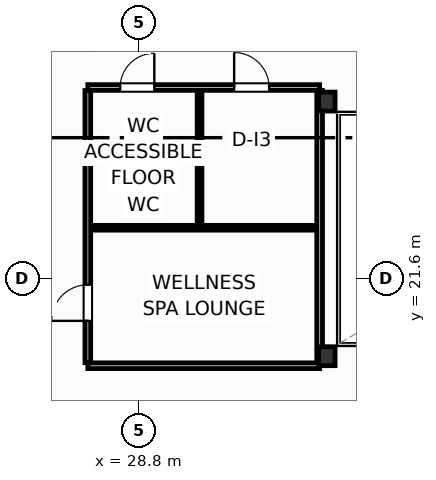
"""IFC4 building model, lengths in metres.
Left out: names, types, materials, properties, quantities, classifications, styles, units other than length and angle.
Written with IfcOpenShell. Run it as: python <this file> out.ifc"""

import sys

from ifc_helpers import new_model, si_unit, direction, frame, frame_2d, origin, origin_2d, place, context, subcontext, project, spatial, rectangle, i_section, extrude, element, fill, save


model = new_model("IFC4")
c1 = context("Model", 3, precision=1e-05, world=origin(), true_north=direction((0.0, 1.0)))
c2 = subcontext(c1, "Body", "Model", "MODEL_VIEW")
j1 = project(units=[si_unit("LENGTHUNIT", "METRE"), si_unit("PLANEANGLEUNIT", "RADIAN")], contexts=[c1])
p1 = place(None, origin())
s1 = spatial("IfcSite", under=j1, at=p1, CompositionType="ELEMENT")
p2 = place(p1, origin())
s2 = spatial("IfcBuilding", under=s1, at=p2, CompositionType="ELEMENT")
p3 = place(p2, frame((0.0, 0.0, 45.5)))
s3 = spatial("IfcBuildingStorey", under=s2, at=p3, CompositionType="ELEMENT", Elevation=45.5)
for number, where, z_axis, x_axis in (
    (1, (33.75, 19.55, 0.0), (0.0, 0.0, 1.0), (1.0, 0.0, 0.0)),
    (2, (33.75, 26.25, 0.0), (0.0, 0.0, 1.0), (1.0, 0.0, 0.0)),
):
    element("IfcColumn", number, at=place(p3, frame(where, z_axis=z_axis, x_axis=x_axis)), inside=s3, PredefinedType="COLUMN", context=c2, shape_type="SweptSolid", body=[
        extrude(i_section(OverallWidth=0.432, OverallDepth=0.498, WebThickness=0.056, FlangeThickness=0.089, FilletRadius=0.025, at=origin_2d()), origin(), (0.0, 0.0, 1.0), 3.7),
    ])
p4 = place(p3, frame((27.46, 19.3, 0.0), z_axis=(0.0, 0.0, 1.0), x_axis=(1.0, 0.0, 0.0)))
e3 = element("IfcWall", 3, at=p4, inside=s3, PredefinedType="PARTITIONING", context=c2, shape_type="SweptSolid", body=[
    extrude(rectangle(XDim=6.1, YDim=0.15, at=frame_2d((3.05, 0.0))), origin(), (0.0, 0.0, 1.0), 2.662),
])
p5 = place(p3, frame((27.46, 26.62, 0.0), z_axis=(0.0, 0.0, 1.0), x_axis=(1.0, 0.0, 0.0)))
e4 = element("IfcWall", 4, at=p5, inside=s3, PredefinedType="PARTITIONING", context=c2, shape_type="SweptSolid", body=[
    extrude(rectangle(XDim=6.1, YDim=0.15, at=frame_2d((3.05, 0.0))), origin(), (0.0, 0.0, 1.0), 2.662),
])
p6 = place(p5, frame((0.85, 0.0, 0.0)))
e5 = element("IfcOpeningElement", 5, at=p6, cuts=e4, PredefinedType="OPENING", context=c2, shape_type="SweptSolid", body=[
    extrude(rectangle(XDim=0.9, YDim=2.05, at=frame_2d((0.45, 1.025))), frame((0.0, 0.085, 0.0), z_axis=(0.0, -1.0, 0.0), x_axis=(1.0, 0.0, 0.0)), (0.0, 0.0, 1.0), 0.17),
])
p7 = place(p5, frame((3.85, 0.0, 0.0)))
e6 = element("IfcOpeningElement", 6, at=p7, cuts=e4, PredefinedType="OPENING", context=c2, shape_type="SweptSolid", body=[
    extrude(rectangle(XDim=0.92, YDim=2.05, at=frame_2d((0.46, 1.025))), frame((0.0, 0.085, 0.0), z_axis=(0.0, -1.0, 0.0), x_axis=(1.0, 0.0, 0.0)), (0.0, 0.0, 1.0), 0.17),
])
p8 = place(p3, frame((27.52, 22.93, 0.0), z_axis=(0.0, 0.0, 1.0), x_axis=(1.0, 0.0, 0.0)))
e7 = element("IfcWall", 7, at=p8, inside=s3, PredefinedType="PARTITIONING", context=c2, shape_type="SweptSolid", body=[
    extrude(rectangle(XDim=6.0, YDim=0.125, at=frame_2d((3.0, 0.0))), origin(), (0.0, 0.0, 1.0), 3.45),
])
p9 = place(p3, frame((30.4, 23.0, 0.0), z_axis=(0.0, 0.0, 1.0), x_axis=(0.0, 1.0, 0.0)))
e8 = element("IfcWall", 8, at=p9, inside=s3, PredefinedType="PARTITIONING", context=c2, shape_type="SweptSolid", body=[
    extrude(rectangle(XDim=3.54, YDim=0.125, at=frame_2d((1.77, 0.0))), origin(), (0.0, 0.0, 1.0), 3.45),
])
p10 = place(p3, frame((27.46, 19.38, 0.0), z_axis=(0.0, 0.0, 1.0), x_axis=(0.0, 1.0, 0.0)))
e9 = element("IfcWall", 9, at=p10, inside=s3, PredefinedType="PARTITIONING", context=c2, shape_type="SweptSolid", body=[
    extrude(rectangle(XDim=7.16, YDim=0.15, at=frame_2d((3.58, 0.0))), origin(), (0.0, 0.0, 1.0), 3.45),
])
p11 = place(p10, frame((1.1, 0.0, 0.0)))
e10 = element("IfcOpeningElement", 10, at=p11, cuts=e9, PredefinedType="OPENING", context=c2, shape_type="SweptSolid", body=[
    extrude(rectangle(XDim=0.95, YDim=2.05, at=frame_2d((0.475, 1.025))), frame((0.0, 0.085, 0.0), z_axis=(0.0, -1.0, 0.0), x_axis=(1.0, 0.0, 0.0)), (0.0, 0.0, 1.0), 0.17),
])
p12 = place(p3, frame((33.56, 19.38, 0.0), z_axis=(0.0, 0.0, 1.0), x_axis=(0.0, 1.0, 0.0)))
e11 = element("IfcWall", 11, at=p12, inside=s3, PredefinedType="PARTITIONING", context=c2, shape_type="SweptSolid", body=[
    extrude(rectangle(XDim=7.16, YDim=0.15, at=frame_2d((3.58, 0.0))), origin(), (0.0, 0.0, 1.0), 2.824),
])
p13 = place(p6, origin())
e12 = element("IfcDoor", 12, at=p13, inside=s3, OperationType="SINGLE_SWING_RIGHT", PredefinedType="DOOR", context=c2, shape_type="SweptSolid", body=[
    extrude(rectangle(XDim=0.9, YDim=2.05, at=frame_2d((0.45, 1.025))), frame((0.0, 0.025, 0.0), z_axis=(0.0, -1.0, 0.0), x_axis=(1.0, 0.0, 0.0)), (0.0, 0.0, 1.0), 0.05),
])
fill(e5, e12)
p14 = place(p7, origin())
e13 = element("IfcDoor", 13, at=p14, inside=s3, OperationType="SINGLE_SWING_LEFT", PredefinedType="DOOR", context=c2, shape_type="SweptSolid", body=[
    extrude(rectangle(XDim=0.92, YDim=2.05, at=frame_2d((0.46, 1.025))), frame((0.0, 0.025, 0.0), z_axis=(0.0, -1.0, 0.0), x_axis=(1.0, 0.0, 0.0)), (0.0, 0.0, 1.0), 0.05),
])
fill(e6, e13)
p15 = place(p11, origin())
e14 = element("IfcDoor", 14, at=p15, inside=s3, OperationType="SINGLE_SWING_LEFT", PredefinedType="DOOR", context=c2, shape_type="SweptSolid", body=[
    extrude(rectangle(XDim=0.95, YDim=2.05, at=frame_2d((0.475, 1.025))), frame((0.0, 0.025, 0.0), z_axis=(0.0, -1.0, 0.0), x_axis=(1.0, 0.0, 0.0)), (0.0, 0.0, 1.0), 0.05),
])
fill(e10, e14)
save(model, sys.argv[1])
